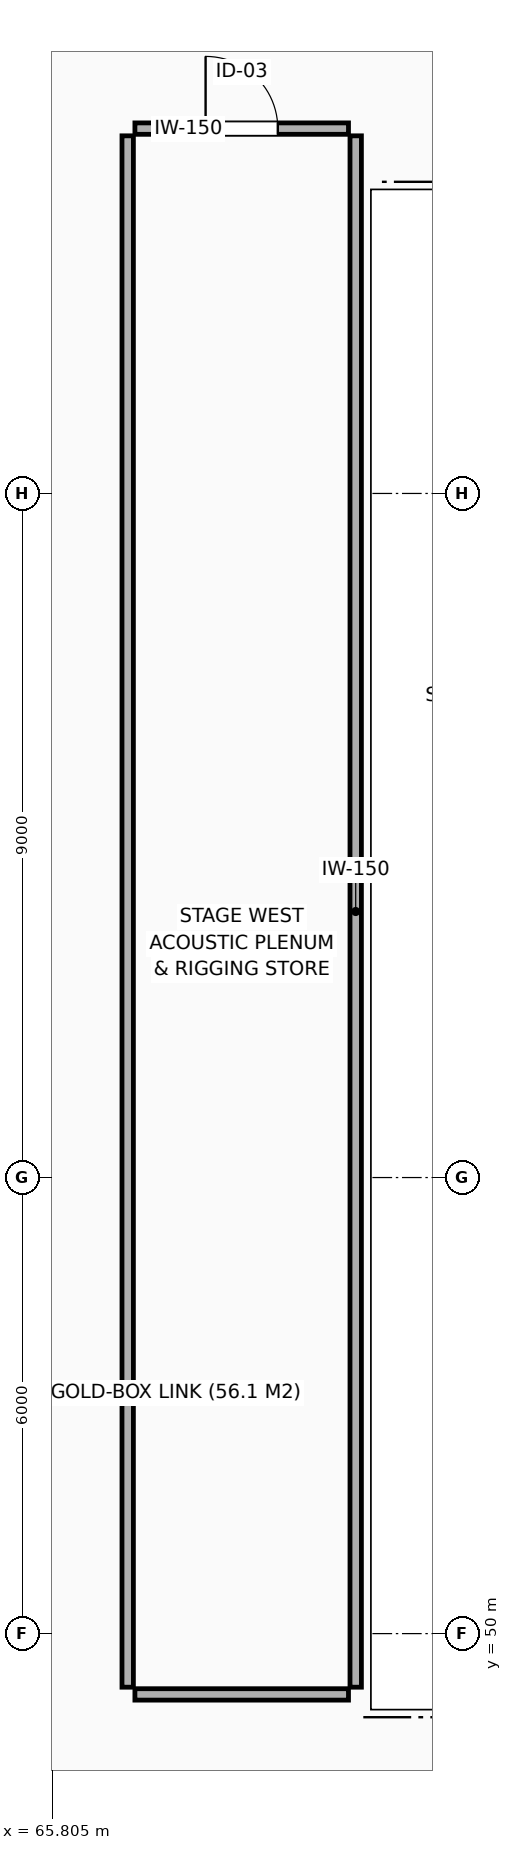
"""IFC4 building model, lengths in metres.
Left out: names, types, materials, properties, quantities, classifications, styles, units other than length and angle.
Written with IfcOpenShell. Run it as: python <this file> out.ifc"""

import sys

from ifc_helpers import new_model, si_unit, direction, frame, frame_2d, origin, place, context, subcontext, project, spatial, rectangle, extrude, element, fill, save


model = new_model("IFC4")
c1 = context("Model", 3, precision=1e-05, world=origin(), true_north=direction((0.0, 1.0)))
c2 = subcontext(c1, "Body", "Model", "MODEL_VIEW")
j1 = project(units=[si_unit("LENGTHUNIT", "METRE"), si_unit("PLANEANGLEUNIT", "RADIAN")], contexts=[c1])
p1 = place(None, origin())
s1 = spatial("IfcSite", under=j1, at=p1, CompositionType="ELEMENT")
p2 = place(p1, origin())
s2 = spatial("IfcBuilding", under=s1, at=p2, CompositionType="ELEMENT")
p3 = place(p2, frame((0.0, 0.0, 19.8)))
s3 = spatial("IfcBuildingStorey", under=s2, at=p3, CompositionType="ELEMENT", Elevation=19.8)
p4 = place(p3, frame((66.895, 69.8, 0.0), z_axis=(0.0, 0.0, 1.0), x_axis=(1.0, 0.0, 0.0)))
e1 = element("IfcWall", 1, at=p4, inside=s3, PredefinedType="PARTITIONING", context=c2, shape_type="SweptSolid", body=[
    extrude(rectangle(XDim=2.81, YDim=0.15, at=frame_2d((1.405, 0.0))), origin(), (0.0, 0.0, 1.0), 4.24),
])
p5 = place(p4, frame((0.93, 0.0, 0.0)))
e2 = element("IfcOpeningElement", 2, at=p5, cuts=e1, PredefinedType="OPENING", context=c2, shape_type="SweptSolid", body=[
    extrude(rectangle(XDim=0.95, YDim=2.15, at=frame_2d((0.475, 1.075))), frame((0.0, 0.085, 0.0), z_axis=(0.0, -1.0, 0.0), x_axis=(1.0, 0.0, 0.0)), (0.0, 0.0, 1.0), 0.17),
])
p6 = place(p3, frame((69.8, 69.705, 0.0), z_axis=(0.0, 0.0, 1.0), x_axis=(0.0, -1.0, 0.0)))
e3 = element("IfcWall", 3, at=p6, inside=s3, PredefinedType="PARTITIONING", context=c2, shape_type="SweptSolid", body=[
    extrude(rectangle(XDim=20.41, YDim=0.15, at=frame_2d((10.205, 0.0))), origin(), (0.0, 0.0, 1.0), 4.24),
])
p7 = place(p3, frame((69.705, 49.2, 0.0), z_axis=(0.0, 0.0, 1.0), x_axis=(-1.0, 0.0, 0.0)))
e4 = element("IfcWall", 4, at=p7, inside=s3, PredefinedType="PARTITIONING", context=c2, shape_type="SweptSolid", body=[
    extrude(rectangle(XDim=2.81, YDim=0.15, at=frame_2d((1.405, 0.0))), origin(), (0.0, 0.0, 1.0), 4.24),
])
p8 = place(p3, frame((66.8, 49.295, 0.0), z_axis=(0.0, 0.0, 1.0), x_axis=(0.0, 1.0, 0.0)))
e5 = element("IfcWall", 5, at=p8, inside=s3, PredefinedType="PARTITIONING", context=c2, shape_type="SweptSolid", body=[
    extrude(rectangle(XDim=20.41, YDim=0.15, at=frame_2d((10.205, 0.0))), origin(), (0.0, 0.0, 1.0), 3.83),
])
p9 = place(p5, origin())
e6 = element("IfcDoor", 6, at=p9, inside=s3, OperationType="SINGLE_SWING_LEFT", PredefinedType="DOOR", context=c2, shape_type="SweptSolid", body=[
    extrude(rectangle(XDim=0.95, YDim=2.15, at=frame_2d((0.475, 1.075))), frame((0.0, 0.025, 0.0), z_axis=(0.0, -1.0, 0.0), x_axis=(1.0, 0.0, 0.0)), (0.0, 0.0, 1.0), 0.05),
])
fill(e2, e6)
save(model, sys.argv[1])
